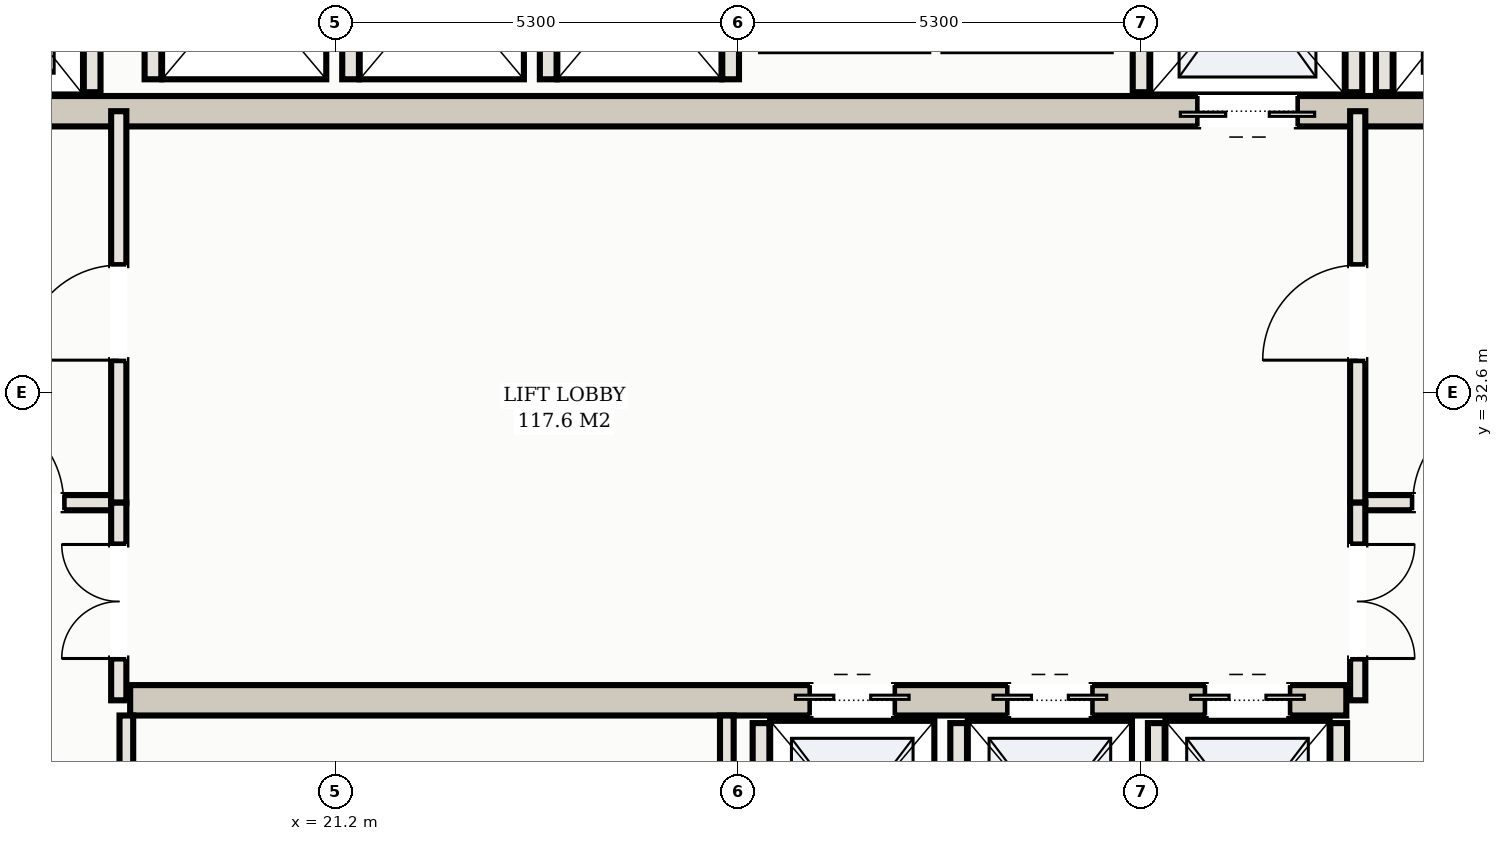
"""IFC4 building model, lengths in metres.
Left out: names, types, materials, properties, quantities, classifications, styles, units other than length and angle.
Written with IfcOpenShell. Run it as: python <this file> out.ifc"""

import sys

from ifc_helpers import new_model, si_unit, direction, frame, frame_2d, origin, place, context, subcontext, project, spatial, rectangle, extrude, element, fill, save


model = new_model("IFC4")
c1 = context("Model", 3, precision=1e-05, world=origin(), true_north=direction((0.0, 1.0)))
c2 = subcontext(c1, "Body", "Model", "MODEL_VIEW")
j1 = project(units=[si_unit("LENGTHUNIT", "METRE"), si_unit("PLANEANGLEUNIT", "RADIAN")], contexts=[c1])
p1 = place(None, origin())
s1 = spatial("IfcSite", under=j1, at=p1, CompositionType="ELEMENT")
p2 = place(p1, origin())
s2 = spatial("IfcBuilding", under=s1, at=p2, CompositionType="ELEMENT")
p3 = place(p2, frame((0.0, 0.0, 182.1)))
s3 = spatial("IfcBuildingStorey", under=s2, at=p3, CompositionType="ELEMENT", Elevation=182.1)
p4 = place(p3, frame((15.5, 36.3, 0.0), z_axis=(0.0, 0.0, 1.0), x_axis=(1.0, 0.0, 0.0)))
e1 = element("IfcWall", 1, at=p4, inside=s3, PredefinedType="SHEAR", context=c2, shape_type="SweptSolid", body=[
    extrude(rectangle(XDim=22.0, YDim=0.4, at=frame_2d((11.0, 0.0))), origin(), (0.0, 0.0, 1.0), 3.03),
])
p5 = place(p4, frame((0.65, 0.0, 0.0)))
e2 = element("IfcOpeningElement", 2, at=p5, cuts=e1, PredefinedType="OPENING", context=c2, shape_type="SweptSolid", body=[
    extrude(rectangle(XDim=1.1, YDim=2.15, at=frame_2d((0.55, 1.075))), frame((0.0, 0.21, 0.0), z_axis=(0.0, -1.0, 0.0), x_axis=(1.0, 0.0, 0.0)), (0.0, 0.0, 1.0), 0.42),
])
p6 = place(p4, frame((20.25, 0.0, 0.0)))
e3 = element("IfcOpeningElement", 3, at=p6, cuts=e1, PredefinedType="OPENING", context=c2, shape_type="SweptSolid", body=[
    extrude(rectangle(XDim=1.1, YDim=2.15, at=frame_2d((0.55, 1.075))), frame((0.0, 0.21, 0.0), z_axis=(0.0, -1.0, 0.0), x_axis=(1.0, 0.0, 0.0)), (0.0, 0.0, 1.0), 0.42),
])
p7 = place(p4, frame((17.05, 0.0, 0.0)))
e4 = element("IfcOpeningElement", 4, at=p7, cuts=e1, PredefinedType="OPENING", context=c2, shape_type="SweptSolid", body=[
    extrude(rectangle(XDim=1.3, YDim=2.2, at=frame_2d((0.65, 1.1))), frame((0.0, 0.21, 0.0), z_axis=(0.0, -1.0, 0.0), x_axis=(1.0, 0.0, 0.0)), (0.0, 0.0, 1.0), 0.42),
])
p8 = place(p3, frame((18.5, 28.55, 0.0), z_axis=(0.0, 0.0, 1.0), x_axis=(1.0, 0.0, 0.0)))
e5 = element("IfcWall", 5, at=p8, inside=s3, PredefinedType="SHEAR", context=c2, shape_type="SweptSolid", body=[
    extrude(rectangle(XDim=16.0, YDim=0.4, at=frame_2d((8.0, 0.0))), origin(), (0.0, 0.0, 1.0), 3.03),
])
p9 = place(p8, frame((8.95, 0.0, 0.0)))
e6 = element("IfcOpeningElement", 6, at=p9, cuts=e5, PredefinedType="OPENING", context=c2, shape_type="SweptSolid", body=[
    extrude(rectangle(XDim=1.1, YDim=2.15, at=frame_2d((0.55, 1.075))), frame((0.0, 0.21, 0.0), z_axis=(0.0, -1.0, 0.0), x_axis=(1.0, 0.0, 0.0)), (0.0, 0.0, 1.0), 0.42),
])
p10 = place(p8, frame((11.55, 0.0, 0.0)))
e7 = element("IfcOpeningElement", 7, at=p10, cuts=e5, PredefinedType="OPENING", context=c2, shape_type="SweptSolid", body=[
    extrude(rectangle(XDim=1.1, YDim=2.15, at=frame_2d((0.55, 1.075))), frame((0.0, 0.21, 0.0), z_axis=(0.0, -1.0, 0.0), x_axis=(1.0, 0.0, 0.0)), (0.0, 0.0, 1.0), 0.42),
])
p11 = place(p8, frame((14.15, 0.0, 0.0)))
e8 = element("IfcOpeningElement", 8, at=p11, cuts=e5, PredefinedType="OPENING", context=c2, shape_type="SweptSolid", body=[
    extrude(rectangle(XDim=1.1, YDim=2.15, at=frame_2d((0.55, 1.075))), frame((0.0, 0.21, 0.0), z_axis=(0.0, -1.0, 0.0), x_axis=(1.0, 0.0, 0.0)), (0.0, 0.0, 1.0), 0.42),
])
for number, where, z_axis, x_axis in (
    (9, (18.0, 36.55, 0.0), (0.0, 0.0, 1.0), (0.0, 1.0, 0.0)),
    (10, (35.0, 36.55, 0.0), (0.0, 0.0, 1.0), (0.0, 1.0, 0.0)),
    (11, (31.8, 36.55, 0.0), (0.0, 0.0, 1.0), (0.0, 1.0, 0.0)),
    (12, (34.6, 36.55, 0.0), (0.0, 0.0, 1.0), (0.0, 1.0, 0.0)),
):
    element("IfcWall", number, at=place(p3, frame(where, z_axis=z_axis, x_axis=x_axis)), inside=s3, PredefinedType="SOLIDWALL", context=c2, shape_type="SweptSolid", body=[
        extrude(rectangle(XDim=2.93, YDim=0.22, at=frame_2d((1.465, 0.0))), origin(), (0.0, 0.0, 1.0), 3.03),
    ])
for number, where, z_axis, x_axis in (
    (13, (26.8, 25.72, 0.0), (0.0, 0.0, 1.0), (0.0, 1.0, 0.0)),
    (14, (29.4, 25.72, 0.0), (0.0, 0.0, 1.0), (0.0, 1.0, 0.0)),
    (15, (32.0, 25.72, 0.0), (0.0, 0.0, 1.0), (0.0, 1.0, 0.0)),
    (16, (34.4, 25.72, 0.0), (0.0, 0.0, 1.0), (0.0, 1.0, 0.0)),
):
    element("IfcWall", number, at=place(p3, frame(where, z_axis=z_axis, x_axis=x_axis)), inside=s3, PredefinedType="SOLIDWALL", context=c2, shape_type="SweptSolid", body=[
        extrude(rectangle(XDim=2.53, YDim=0.22, at=frame_2d((1.265, 0.0))), origin(), (0.0, 0.0, 1.0), 3.03),
    ])
for number, where, z_axis, x_axis in (
    (17, (18.8, 36.72, 0.0), (0.0, 0.0, 1.0), (0.0, 1.0, 0.0)),
    (18, (21.4, 36.72, 0.0), (0.0, 0.0, 1.0), (0.0, 1.0, 0.0)),
    (19, (24.0, 36.72, 0.0), (0.0, 0.0, 1.0), (0.0, 1.0, 0.0)),
    (20, (26.4, 36.72, 0.0), (0.0, 0.0, 1.0), (0.0, 1.0, 0.0)),
):
    element("IfcWall", number, at=place(p3, frame(where, z_axis=z_axis, x_axis=x_axis)), inside=s3, PredefinedType="SOLIDWALL", context=c2, shape_type="SweptSolid", body=[
        extrude(rectangle(XDim=2.56, YDim=0.22, at=frame_2d((1.28, 0.0))), origin(), (0.0, 0.0, 1.0), 3.03),
    ])
p12 = place(p3, frame((15.1, 31.15, 0.0), z_axis=(0.0, 0.0, 1.0), x_axis=(1.0, 0.0, 0.0)))
e21 = element("IfcWall", 21, at=p12, inside=s3, PredefinedType="PARTITIONING", context=c2, shape_type="SweptSolid", body=[
    extrude(rectangle(XDim=3.25, YDim=0.2, at=frame_2d((1.625, 0.0))), origin(), (0.0, 0.0, 1.0), 2.57),
])
p13 = place(p12, frame((1.275, 0.0, 0.0)))
e22 = element("IfcOpeningElement", 22, at=p13, cuts=e21, PredefinedType="OPENING", context=c2, shape_type="SweptSolid", body=[
    extrude(rectangle(XDim=1.25, YDim=2.2, at=frame_2d((0.625, 1.1))), frame((0.0, 0.11, 0.0), z_axis=(0.0, -1.0, 0.0), x_axis=(1.0, 0.0, 0.0)), (0.0, 0.0, 1.0), 0.22),
])
p14 = place(p3, frame((18.35, 31.15, 0.0), z_axis=(0.0, 0.0, 1.0), x_axis=(0.0, 1.0, 0.0)))
e23 = element("IfcWall", 23, at=p14, inside=s3, PredefinedType="PARTITIONING", context=c2, shape_type="SweptSolid", body=[
    extrude(rectangle(XDim=5.15, YDim=0.2, at=frame_2d((2.575, 0.0))), origin(), (0.0, 0.0, 1.0), 2.57),
])
p15 = place(p14, frame((1.875, 0.0, 0.0)))
e24 = element("IfcOpeningElement", 24, at=p15, cuts=e23, PredefinedType="OPENING", context=c2, shape_type="SweptSolid", body=[
    extrude(rectangle(XDim=1.25, YDim=2.2, at=frame_2d((0.625, 1.1))), frame((0.0, 0.11, 0.0), z_axis=(0.0, -1.0, 0.0), x_axis=(1.0, 0.0, 0.0)), (0.0, 0.0, 1.0), 0.22),
])
p16 = place(p3, frame((34.65, 31.15, 0.0), z_axis=(0.0, 0.0, 1.0), x_axis=(1.0, 0.0, 0.0)))
e25 = element("IfcWall", 25, at=p16, inside=s3, PredefinedType="PARTITIONING", context=c2, shape_type="SweptSolid", body=[
    extrude(rectangle(XDim=3.25, YDim=0.2, at=frame_2d((1.625, 0.0))), origin(), (0.0, 0.0, 1.0), 2.57),
])
p17 = place(p16, frame((0.725, 0.0, 0.0)))
e26 = element("IfcOpeningElement", 26, at=p17, cuts=e25, PredefinedType="OPENING", context=c2, shape_type="SweptSolid", body=[
    extrude(rectangle(XDim=1.25, YDim=2.2, at=frame_2d((0.625, 1.1))), frame((0.0, 0.11, 0.0), z_axis=(0.0, -1.0, 0.0), x_axis=(1.0, 0.0, 0.0)), (0.0, 0.0, 1.0), 0.22),
])
p18 = place(p3, frame((34.65, 31.15, 0.0), z_axis=(0.0, 0.0, 1.0), x_axis=(0.0, 1.0, 0.0)))
e27 = element("IfcWall", 27, at=p18, inside=s3, PredefinedType="PARTITIONING", context=c2, shape_type="SweptSolid", body=[
    extrude(rectangle(XDim=5.15, YDim=0.2, at=frame_2d((2.575, 0.0))), origin(), (0.0, 0.0, 1.0), 2.57),
])
p19 = place(p18, frame((1.875, 0.0, 0.0)))
e28 = element("IfcOpeningElement", 28, at=p19, cuts=e27, PredefinedType="OPENING", context=c2, shape_type="SweptSolid", body=[
    extrude(rectangle(XDim=1.25, YDim=2.2, at=frame_2d((0.625, 1.1))), frame((0.0, 0.11, 0.0), z_axis=(0.0, -1.0, 0.0), x_axis=(1.0, 0.0, 0.0)), (0.0, 0.0, 1.0), 0.22),
])
p20 = place(p3, frame((18.35, 28.55, 0.0), z_axis=(0.0, 0.0, 1.0), x_axis=(0.0, 1.0, 0.0)))
e29 = element("IfcWall", 29, at=p20, inside=s3, PredefinedType="PARTITIONING", context=c2, shape_type="SweptSolid", body=[
    extrude(rectangle(XDim=2.6, YDim=0.2, at=frame_2d((1.3, 0.0))), origin(), (0.0, 0.0, 1.0), 2.57),
])
p21 = place(p20, frame((0.55, 0.0, 0.0)))
e30 = element("IfcOpeningElement", 30, at=p21, cuts=e29, PredefinedType="OPENING", context=c2, shape_type="SweptSolid", body=[
    extrude(rectangle(XDim=1.5, YDim=2.25, at=frame_2d((0.75, 1.125))), frame((0.0, 0.11, 0.0), z_axis=(0.0, -1.0, 0.0), x_axis=(1.0, 0.0, 0.0)), (0.0, 0.0, 1.0), 0.22),
])
p22 = place(p3, frame((34.65, 28.55, 0.0), z_axis=(0.0, 0.0, 1.0), x_axis=(0.0, 1.0, 0.0)))
e31 = element("IfcWall", 31, at=p22, inside=s3, PredefinedType="PARTITIONING", context=c2, shape_type="SweptSolid", body=[
    extrude(rectangle(XDim=2.6, YDim=0.2, at=frame_2d((1.3, 0.0))), origin(), (0.0, 0.0, 1.0), 2.57),
])
p23 = place(p22, frame((0.55, 0.0, 0.0)))
e32 = element("IfcOpeningElement", 32, at=p23, cuts=e31, PredefinedType="OPENING", context=c2, shape_type="SweptSolid", body=[
    extrude(rectangle(XDim=1.5, YDim=2.25, at=frame_2d((0.75, 1.125))), frame((0.0, 0.11, 0.0), z_axis=(0.0, -1.0, 0.0), x_axis=(1.0, 0.0, 0.0)), (0.0, 0.0, 1.0), 0.22),
])
for number, where, z_axis, x_axis in (
    (33, (18.45, 25.62, 0.0), (0.0, 0.0, 1.0), (0.0, 1.0, 0.0)),
    (34, (26.35, 25.62, 0.0), (0.0, 0.0, 1.0), (0.0, 1.0, 0.0)),
):
    element("IfcWall", number, at=place(p3, frame(where, z_axis=z_axis, x_axis=x_axis)), inside=s3, PredefinedType="PARTITIONING", context=c2, shape_type="SweptSolid", body=[
        extrude(rectangle(XDim=2.73, YDim=0.18, at=frame_2d((1.365, 0.0))), origin(), (0.0, 0.0, 1.0), 2.57),
    ])
p24 = place(p7, frame((1.3, 0.0, 0.0), z_axis=(0.0, 0.0, 1.0), x_axis=(-1.0, 0.0, 0.0)))
e35 = element("IfcDoor", 35, at=p24, inside=s3, OperationType="DOUBLE_DOOR_SLIDING", PredefinedType="DOOR", context=c2, shape_type="SweptSolid", body=[
    extrude(rectangle(XDim=1.3, YDim=2.2, at=frame_2d((0.65, 1.1))), frame((0.0, 0.025, 0.0), z_axis=(0.0, -1.0, 0.0), x_axis=(1.0, 0.0, 0.0)), (0.0, 0.0, 1.0), 0.05),
])
fill(e4, e35)
p25 = place(p9, origin())
e36 = element("IfcDoor", 36, at=p25, inside=s3, OperationType="DOUBLE_DOOR_SLIDING", PredefinedType="DOOR", context=c2, shape_type="SweptSolid", body=[
    extrude(rectangle(XDim=1.1, YDim=2.15, at=frame_2d((0.55, 1.075))), frame((0.0, 0.025, 0.0), z_axis=(0.0, -1.0, 0.0), x_axis=(1.0, 0.0, 0.0)), (0.0, 0.0, 1.0), 0.05),
])
fill(e6, e36)
p26 = place(p10, origin())
e37 = element("IfcDoor", 37, at=p26, inside=s3, OperationType="DOUBLE_DOOR_SLIDING", PredefinedType="DOOR", context=c2, shape_type="SweptSolid", body=[
    extrude(rectangle(XDim=1.1, YDim=2.15, at=frame_2d((0.55, 1.075))), frame((0.0, 0.025, 0.0), z_axis=(0.0, -1.0, 0.0), x_axis=(1.0, 0.0, 0.0)), (0.0, 0.0, 1.0), 0.05),
])
fill(e7, e37)
p27 = place(p11, origin())
e38 = element("IfcDoor", 38, at=p27, inside=s3, OperationType="DOUBLE_DOOR_SLIDING", PredefinedType="DOOR", context=c2, shape_type="SweptSolid", body=[
    extrude(rectangle(XDim=1.1, YDim=2.15, at=frame_2d((0.55, 1.075))), frame((0.0, 0.025, 0.0), z_axis=(0.0, -1.0, 0.0), x_axis=(1.0, 0.0, 0.0)), (0.0, 0.0, 1.0), 0.05),
])
fill(e8, e38)
p28 = place(p13, origin())
e39 = element("IfcDoor", 39, at=p28, inside=s3, OperationType="SINGLE_SWING_LEFT", PredefinedType="DOOR", context=c2, shape_type="SweptSolid", body=[
    extrude(rectangle(XDim=1.25, YDim=2.2, at=frame_2d((0.625, 1.1))), frame((0.0, 0.025, 0.0), z_axis=(0.0, -1.0, 0.0), x_axis=(1.0, 0.0, 0.0)), (0.0, 0.0, 1.0), 0.05),
])
fill(e22, e39)
p29 = place(p15, origin())
e40 = element("IfcDoor", 40, at=p29, inside=s3, OperationType="SINGLE_SWING_LEFT", PredefinedType="DOOR", context=c2, shape_type="SweptSolid", body=[
    extrude(rectangle(XDim=1.25, YDim=2.2, at=frame_2d((0.625, 1.1))), frame((0.0, 0.025, 0.0), z_axis=(0.0, -1.0, 0.0), x_axis=(1.0, 0.0, 0.0)), (0.0, 0.0, 1.0), 0.05),
])
fill(e24, e40)
p30 = place(p17, origin())
e41 = element("IfcDoor", 41, at=p30, inside=s3, OperationType="SINGLE_SWING_RIGHT", PredefinedType="DOOR", context=c2, shape_type="SweptSolid", body=[
    extrude(rectangle(XDim=1.25, YDim=2.2, at=frame_2d((0.625, 1.1))), frame((0.0, 0.025, 0.0), z_axis=(0.0, -1.0, 0.0), x_axis=(1.0, 0.0, 0.0)), (0.0, 0.0, 1.0), 0.05),
])
fill(e26, e41)
p31 = place(p19, origin())
e42 = element("IfcDoor", 42, at=p31, inside=s3, OperationType="SINGLE_SWING_LEFT", PredefinedType="DOOR", context=c2, shape_type="SweptSolid", body=[
    extrude(rectangle(XDim=1.25, YDim=2.2, at=frame_2d((0.625, 1.1))), frame((0.0, 0.025, 0.0), z_axis=(0.0, -1.0, 0.0), x_axis=(1.0, 0.0, 0.0)), (0.0, 0.0, 1.0), 0.05),
])
fill(e28, e42)
p32 = place(p21, origin())
e43 = element("IfcDoor", 43, at=p32, inside=s3, OperationType="DOUBLE_DOOR_SINGLE_SWING", PredefinedType="DOOR", context=c2, shape_type="SweptSolid", body=[
    extrude(rectangle(XDim=1.5, YDim=2.25, at=frame_2d((0.75, 1.125))), frame((0.0, 0.025, 0.0), z_axis=(0.0, -1.0, 0.0), x_axis=(1.0, 0.0, 0.0)), (0.0, 0.0, 1.0), 0.05),
])
fill(e30, e43)
p33 = place(p23, frame((1.5, 0.0, 0.0), z_axis=(0.0, 0.0, 1.0), x_axis=(-1.0, 0.0, 0.0)))
e44 = element("IfcDoor", 44, at=p33, inside=s3, OperationType="DOUBLE_DOOR_SINGLE_SWING", PredefinedType="DOOR", context=c2, shape_type="SweptSolid", body=[
    extrude(rectangle(XDim=1.5, YDim=2.25, at=frame_2d((0.75, 1.125))), frame((0.0, 0.025, 0.0), z_axis=(0.0, -1.0, 0.0), x_axis=(1.0, 0.0, 0.0)), (0.0, 0.0, 1.0), 0.05),
])
fill(e32, e44)
save(model, sys.argv[1])
